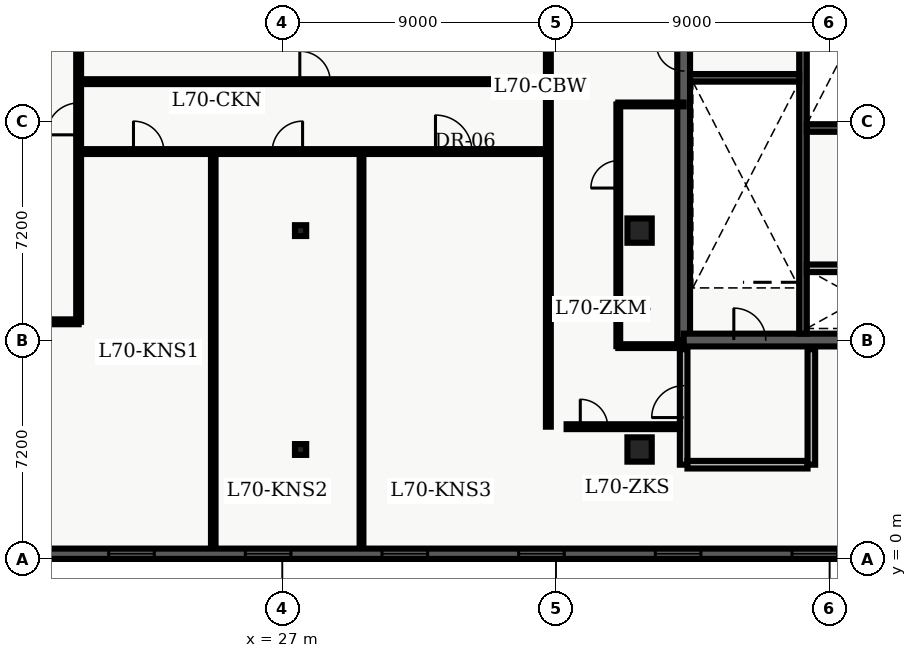
"""IFC4 building model, lengths in metres.
Left out: names, types, materials, properties, quantities, classifications, styles, units other than length and angle.
Written with IfcOpenShell. Run it as: python <this file> out.ifc"""

import sys

from ifc_helpers import new_model, entity, si_unit, converted_unit, direction, frame, origin_with_axes, origin_2d_with_axis, place, context, subcontext, project, spatial, polyline, rectangle, i_section, outline, extrude, element, fill, save


model = new_model("IFC4")
c1 = context("Model", 3, precision=1e-05, world=origin_with_axes(), true_north=direction((0.0, 1.0)))
c2 = subcontext(c1, "Body", "Model", "MODEL_VIEW")
j1 = project(units=[si_unit("LENGTHUNIT", "METRE"), converted_unit("PLANEANGLEUNIT", "DEGREE", entity("IfcPlaneAngleMeasure", 0.017), si_unit("PLANEANGLEUNIT", "RADIAN"), dimensions=[0, 0, 0, 0, 0, 0, 0])], contexts=[c1])
p1 = place(None, origin_with_axes())
s1 = spatial("IfcSite", under=j1, at=p1, CompositionType="ELEMENT")
p2 = place(p1, origin_with_axes())
s2 = spatial("IfcBuilding", under=s1, at=p2, CompositionType="ELEMENT")
p3 = place(p2, frame((0.0, 0.0, 284.1), z_axis=(0.0, 0.0, 1.0), x_axis=(1.0, 0.0, 0.0)))
s3 = spatial("IfcBuildingStorey", under=s2, at=p3, CompositionType="ELEMENT", Elevation=284.1)
p4 = place(p3, frame((40.2, 7.2, 0.0), z_axis=(0.0, 0.0, 1.0), x_axis=(0.0, 1.0, 0.0)))
e1 = element("IfcWall", 1, at=p4, inside=s3, PredefinedType="SHEAR", context=c2, shape_type="SweptSolid", body=[
    extrude(outline(polyline([(0.0, -0.21), (15.6, -0.21), (15.6, 0.21), (0.0, 0.21), (0.0, -0.21)])), origin_with_axes(), (0.0, 0.0, 1.0), 3.6),
])
p5 = place(p4, frame((12.75, 0.0, 0.0), z_axis=(0.0, 0.0, 1.0), x_axis=(1.0, 0.0, 0.0)))
e2 = element("IfcOpeningElement", 2, at=p5, cuts=e1, PredefinedType="OPENING", context=c2, shape_type="SweptSolid", body=[
    extrude(rectangle(XDim=1.2, YDim=0.44, at=origin_2d_with_axis()), origin_with_axes(), (0.0, 0.0, 1.0), 2.15),
])
p6 = place(p4, frame((9.3, 0.0, 0.0), z_axis=(0.0, 0.0, 1.0), x_axis=(1.0, 0.0, 0.0)))
e3 = element("IfcOpeningElement", 3, at=p6, cuts=e1, PredefinedType="OPENING", context=c2, shape_type="SweptSolid", body=[
    extrude(rectangle(XDim=0.9, YDim=0.44, at=origin_2d_with_axis()), origin_with_axes(), (0.0, 0.0, 1.0), 2.15),
])
p7 = place(p3, frame((40.2, 7.2, 0.0), z_axis=(0.0, 0.0, 1.0), x_axis=(1.0, 0.0, 0.0)))
e4 = element("IfcWall", 4, at=p7, inside=s3, PredefinedType="SHEAR", context=c2, shape_type="SweptSolid", body=[
    extrude(outline(polyline([(0.0, -0.21), (7.85, -0.21), (7.85, 0.21), (0.0, 0.21), (0.0, -0.21)])), origin_with_axes(), (0.0, 0.0, 1.0), 3.6),
])
p8 = place(p7, frame((2.175, 0.0, 0.0), z_axis=(0.0, 0.0, 1.0), x_axis=(1.0, 0.0, 0.0)))
e5 = element("IfcOpeningElement", 5, at=p8, cuts=e4, PredefinedType="OPENING", context=c2, shape_type="SweptSolid", body=[
    extrude(rectangle(XDim=1.05, YDim=0.44, at=origin_2d_with_axis()), origin_with_axes(), (0.0, 0.0, 1.0), 2.15),
])
p9 = place(p3, frame((44.125, 7.41, 0.0), z_axis=(0.0, 0.0, 1.0), x_axis=(0.0, 1.0, 0.0)))
e6 = element("IfcWall", 6, at=p9, inside=s3, PredefinedType="SHEAR", context=c2, shape_type="SweptSolid", body=[
    extrude(outline(polyline([(0.0, -0.125), (15.18, -0.125), (15.18, 0.125), (0.0, 0.125), (0.0, -0.125)])), origin_with_axes(), (0.0, 0.0, 1.0), 3.6),
])
for number, where, z_axis, x_axis in (
    (7, (40.41, 15.825, 0.0), (0.0, 0.0, 1.0), (1.0, 0.0, 0.0)),
    (8, (44.25, 14.175, 0.0), (0.0, 0.0, 1.0), (1.0, 0.0, 0.0)),
):
    element("IfcWall", number, at=place(p3, frame(where, z_axis=z_axis, x_axis=x_axis)), inside=s3, PredefinedType="SHEAR", context=c2, shape_type="SweptSolid", body=[
        extrude(outline(polyline([(0.0, -0.125), (3.59, -0.125), (3.59, 0.125), (0.0, 0.125), (0.0, -0.125)])), origin_with_axes(), (0.0, 0.0, 1.0), 3.6),
    ])
p10 = place(p3, frame((40.2, 3.1, 0.0), z_axis=(0.0, 0.0, 1.0), x_axis=(0.0, 1.0, 0.0)))
e9 = element("IfcWall", 9, at=p10, inside=s3, PredefinedType="SOLIDWALL", context=c2, shape_type="SweptSolid", body=[
    extrude(outline(polyline([(0.0, -0.125), (3.8, -0.125), (3.8, 0.125), (0.0, 0.125), (0.0, -0.125)])), origin_with_axes(), (0.0, 0.0, 1.0), 2.64),
])
p11 = place(p10, frame((2.075, 0.0, 0.0), z_axis=(0.0, 0.0, 1.0), x_axis=(1.0, 0.0, 0.0)))
e10 = element("IfcOpeningElement", 10, at=p11, cuts=e9, PredefinedType="OPENING", context=c2, shape_type="SweptSolid", body=[
    extrude(rectangle(XDim=1.05, YDim=0.27, at=origin_2d_with_axis()), origin_with_axes(), (0.0, 0.0, 1.0), 2.15),
])
p12 = place(p3, frame((40.325, 3.1, 0.0), z_axis=(0.0, 0.0, 1.0), x_axis=(1.0, 0.0, 0.0)))
e11 = element("IfcWall", 11, at=p12, inside=s3, PredefinedType="SOLIDWALL", context=c2, shape_type="SweptSolid", body=[
    extrude(outline(polyline([(0.0, -0.125), (3.95, -0.125), (3.95, 0.125), (0.0, 0.125), (0.0, -0.125)])), origin_with_axes(), (0.0, 0.0, 1.0), 2.64),
])
p13 = place(p3, frame((44.4, 3.1, 0.0), z_axis=(0.0, 0.0, 1.0), x_axis=(0.0, 1.0, 0.0)))
e12 = element("IfcWall", 12, at=p13, inside=s3, PredefinedType="SOLIDWALL", context=c2, shape_type="SweptSolid", body=[
    extrude(outline(polyline([(0.0, -0.125), (3.8, -0.125), (3.8, 0.125), (0.0, 0.125), (0.0, -0.125)])), origin_with_axes(), (0.0, 0.0, 1.0), 2.64),
])
for number, where, z_axis, x_axis in (
    (13, (27.6, 3.6, 0.0), (0.0, 0.0, 1.0), (1.0, 0.0, 0.0)),
    (14, (27.6, 10.8, 0.0), (0.0, 0.0, 1.0), (1.0, 0.0, 0.0)),
):
    element("IfcColumn", number, at=place(p3, frame(where, z_axis=z_axis, x_axis=x_axis)), inside=s3, PredefinedType="COLUMN", context=c2, shape_type="SweptSolid", body=[
        extrude(i_section(OverallWidth=0.369, OverallDepth=0.356, WebThickness=0.011, FlangeThickness=0.018, FilletRadius=0.018, at=origin_2d_with_axis()), origin_with_axes(), (0.0, 0.0, 1.0), 3.9),
    ])
for number, where, z_axis, x_axis in (
    (15, (38.75, 3.6, 0.0), (0.0, 0.0, 1.0), (1.0, 0.0, 0.0)),
    (16, (38.75, 10.8, 0.0), (0.0, 0.0, 1.0), (1.0, 0.0, 0.0)),
):
    element("IfcColumn", number, at=place(p3, frame(where, z_axis=z_axis, x_axis=x_axis)), inside=s3, PredefinedType="COLUMN", context=c2, shape_type="SweptSolid", body=[
        extrude(rectangle(XDim=0.8, YDim=0.8, at=origin_2d_with_axis()), origin_with_axes(), (0.0, 0.0, 1.0), 3.9),
    ])
p14 = place(p3, frame((44.25, 9.56, 0.0), z_axis=(0.0, 0.0, 1.0), x_axis=(1.0, 0.0, 0.0)))
e17 = element("IfcWall", 17, at=p14, inside=s3, PredefinedType="SOLIDWALL", context=c2, shape_type="SweptSolid", body=[
    extrude(outline(polyline([(0.0, -0.125), (3.5, -0.125), (3.5, 0.125), (0.0, 0.125), (0.0, -0.125)])), origin_with_axes(), (0.0, 0.0, 1.0), 2.64),
])
p15 = place(p3, frame((8.135, 7.8, 0.0), z_axis=(0.0, 0.0, 1.0), x_axis=(1.0, 0.0, 0.0)))
e18 = element("IfcWall", 18, at=p15, inside=s3, PredefinedType="PARTITIONING", context=c2, shape_type="SweptSolid", body=[
    extrude(outline(polyline([(0.0, -0.08), (12.165, -0.08), (12.165, 0.08), (0.0, 0.08), (0.0, -0.08)])), origin_with_axes(), (0.0, 0.0, 1.0), 2.64),
])
p16 = place(p15, frame((6.065, 0.0, 0.0), z_axis=(0.0, 0.0, 1.0), x_axis=(1.0, 0.0, 0.0)))
e19 = element("IfcOpeningElement", 19, at=p16, cuts=e18, PredefinedType="OPENING", context=c2, shape_type="SweptSolid", body=[
    extrude(rectangle(XDim=1.0, YDim=0.18, at=origin_2d_with_axis()), origin_with_axes(), (0.0, 0.0, 1.0), 2.15),
])
p17 = place(p3, frame((20.3, 7.8, 0.0), z_axis=(0.0, 0.0, 1.0), x_axis=(0.0, 1.0, 0.0)))
e20 = element("IfcWall", 20, at=p17, inside=s3, PredefinedType="PARTITIONING", context=c2, shape_type="SweptSolid", body=[
    extrude(outline(polyline([(0.0, -0.08), (32.7, -0.08), (32.7, 0.08), (0.0, 0.08), (0.0, -0.08)])), origin_with_axes(), (0.0, 0.0, 1.0), 2.64),
])
p18 = place(p17, frame((25.025, 0.0, 0.0), z_axis=(0.0, 0.0, 1.0), x_axis=(1.0, 0.0, 0.0)))
e21 = element("IfcOpeningElement", 21, at=p18, cuts=e20, PredefinedType="OPENING", context=c2, shape_type="SweptSolid", body=[
    extrude(rectangle(XDim=1.05, YDim=0.18, at=origin_2d_with_axis()), origin_with_axes(), (0.0, 0.0, 1.0), 2.15),
])
p19 = place(p17, frame((14.273, 0.0, 0.0), z_axis=(0.0, 0.0, 1.0), x_axis=(1.0, 0.0, 0.0)))
e22 = element("IfcOpeningElement", 22, at=p19, cuts=e20, PredefinedType="OPENING", context=c2, shape_type="SweptSolid", body=[
    extrude(rectangle(XDim=1.0, YDim=0.18, at=origin_2d_with_axis()), origin_with_axes(), (0.0, 0.0, 1.0), 2.15),
])
p20 = place(p17, frame((18.447, 0.0, 0.0), z_axis=(0.0, 0.0, 1.0), x_axis=(1.0, 0.0, 0.0)))
e23 = element("IfcOpeningElement", 23, at=p20, cuts=e20, PredefinedType="OPENING", context=c2, shape_type="SweptSolid", body=[
    extrude(rectangle(XDim=1.0, YDim=0.18, at=origin_2d_with_axis()), origin_with_axes(), (0.0, 0.0, 1.0), 2.15),
])
p21 = place(p17, frame((6.675, 0.0, 0.0), z_axis=(0.0, 0.0, 1.0), x_axis=(1.0, 0.0, 0.0)))
e24 = element("IfcOpeningElement", 24, at=p21, cuts=e20, PredefinedType="OPENING", context=c2, shape_type="SweptSolid", body=[
    extrude(rectangle(XDim=1.05, YDim=0.18, at=origin_2d_with_axis()), origin_with_axes(), (0.0, 0.0, 1.0), 2.15),
])
p22 = place(p3, frame((20.3, 13.4, 0.0), z_axis=(0.0, 0.0, 1.0), x_axis=(1.0, 0.0, 0.0)))
e25 = element("IfcWall", 25, at=p22, inside=s3, PredefinedType="PARTITIONING", context=c2, shape_type="SweptSolid", body=[
    extrude(outline(polyline([(0.0, -0.08), (15.45, -0.08), (15.45, 0.08), (0.0, 0.08), (0.0, -0.08)])), origin_with_axes(), (0.0, 0.0, 1.0), 2.64),
])
p23 = place(p22, frame((2.304, 0.0, 0.0), z_axis=(0.0, 0.0, 1.0), x_axis=(1.0, 0.0, 0.0)))
e26 = element("IfcOpeningElement", 26, at=p23, cuts=e25, PredefinedType="OPENING", context=c2, shape_type="SweptSolid", body=[
    extrude(rectangle(XDim=1.0, YDim=0.18, at=origin_2d_with_axis()), origin_with_axes(), (0.0, 0.0, 1.0), 2.15),
])
p24 = place(p22, frame((6.866, 0.0, 0.0), z_axis=(0.0, 0.0, 1.0), x_axis=(1.0, 0.0, 0.0)))
e27 = element("IfcOpeningElement", 27, at=p24, cuts=e25, PredefinedType="OPENING", context=c2, shape_type="SweptSolid", body=[
    extrude(rectangle(XDim=1.0, YDim=0.18, at=origin_2d_with_axis()), origin_with_axes(), (0.0, 0.0, 1.0), 2.15),
])
p25 = place(p22, frame((12.337, 0.0, 0.0), z_axis=(0.0, 0.0, 1.0), x_axis=(1.0, 0.0, 0.0)))
e28 = element("IfcOpeningElement", 28, at=p25, cuts=e25, PredefinedType="OPENING", context=c2, shape_type="SweptSolid", body=[
    extrude(rectangle(XDim=1.2, YDim=0.18, at=origin_2d_with_axis()), origin_with_axes(), (0.0, 0.0, 1.0), 2.2),
])
p26 = place(p3, frame((20.3, 15.7, 0.0), z_axis=(0.0, 0.0, 1.0), x_axis=(1.0, 0.0, 0.0)))
e29 = element("IfcWall", 29, at=p26, inside=s3, PredefinedType="PARTITIONING", context=c2, shape_type="SweptSolid", body=[
    extrude(outline(polyline([(0.0, -0.08), (15.45, -0.08), (15.45, 0.08), (0.0, 0.08), (0.0, -0.08)])), origin_with_axes(), (0.0, 0.0, 1.0), 2.64),
])
p27 = place(p26, frame((7.775, 0.0, 0.0), z_axis=(0.0, 0.0, 1.0), x_axis=(1.0, 0.0, 0.0)))
e30 = element("IfcOpeningElement", 30, at=p27, cuts=e29, PredefinedType="OPENING", context=c2, shape_type="SweptSolid", body=[
    extrude(rectangle(XDim=1.0, YDim=0.18, at=origin_2d_with_axis()), origin_with_axes(), (0.0, 0.0, 1.0), 2.15),
])
p28 = place(p3, frame((35.75, 4.35, 0.0), z_axis=(0.0, 0.0, 1.0), x_axis=(0.0, 1.0, 0.0)))
e31 = element("IfcWall", 31, at=p28, inside=s3, PredefinedType="PARTITIONING", context=c2, shape_type="SweptSolid", body=[
    extrude(outline(polyline([(0.0, -0.08), (16.95, -0.08), (16.95, 0.08), (0.0, 0.08), (0.0, -0.08)])), origin_with_axes(), (0.0, 0.0, 1.0), 2.64),
])
p29 = place(p3, frame((24.728, 0.335, 0.0), z_axis=(0.0, 0.0, 1.0), x_axis=(0.0, 1.0, 0.0)))
e32 = element("IfcWall", 32, at=p29, inside=s3, PredefinedType="PARTITIONING", context=c2, shape_type="SweptSolid", body=[
    extrude(outline(polyline([(0.0, -0.075), (12.945, -0.075), (12.945, 0.075), (0.0, 0.075), (0.0, -0.075)])), origin_with_axes(), (0.0, 0.0, 1.0), 2.64),
])
p30 = place(p3, frame((29.604, 0.335, 0.0), z_axis=(0.0, 0.0, 1.0), x_axis=(0.0, 1.0, 0.0)))
e33 = element("IfcWall", 33, at=p30, inside=s3, PredefinedType="PARTITIONING", context=c2, shape_type="SweptSolid", body=[
    extrude(outline(polyline([(0.0, -0.062), (12.945, -0.062), (12.945, 0.062), (0.0, 0.062), (0.0, -0.062)])), origin_with_axes(), (0.0, 0.0, 1.0), 2.64),
])
p31 = place(p3, frame((36.35, 4.35, 0.0), z_axis=(0.0, 0.0, 1.0), x_axis=(1.0, 0.0, 0.0)))
e34 = element("IfcWall", 34, at=p31, inside=s3, PredefinedType="PARTITIONING", context=c2, shape_type="SweptSolid", body=[
    extrude(outline(polyline([(0.0, -0.08), (3.725, -0.08), (3.725, 0.08), (0.0, 0.08), (0.0, -0.08)])), origin_with_axes(), (0.0, 0.0, 1.0), 2.64),
])
p32 = place(p31, frame((0.9, 0.0, 0.0), z_axis=(0.0, 0.0, 1.0), x_axis=(1.0, 0.0, 0.0)))
e35 = element("IfcOpeningElement", 35, at=p32, cuts=e34, PredefinedType="OPENING", context=c2, shape_type="SweptSolid", body=[
    extrude(rectangle(XDim=0.9, YDim=0.18, at=origin_2d_with_axis()), origin_with_axes(), (0.0, 0.0, 1.0), 2.15),
])
for number, where, z_axis, x_axis in (
    (36, (38.05, 7.0, 0.0), (0.0, 0.0, 1.0), (1.0, 0.0, 0.0)),
    (37, (38.05, 14.95, 0.0), (0.0, 0.0, 1.0), (1.0, 0.0, 0.0)),
):
    element("IfcWall", number, at=place(p3, frame(where, z_axis=z_axis, x_axis=x_axis)), inside=s3, PredefinedType="PARTITIONING", context=c2, shape_type="SweptSolid", body=[
        extrude(outline(polyline([(0.0, -0.062), (2.15, -0.062), (2.15, 0.062), (0.0, 0.062), (0.0, -0.062)])), origin_with_axes(), (0.0, 0.0, 1.0), 2.64),
    ])
p33 = place(p3, frame((38.05, 7.0, 0.0), z_axis=(0.0, 0.0, 1.0), x_axis=(0.0, 1.0, 0.0)))
e38 = element("IfcWall", 38, at=p33, inside=s3, PredefinedType="PARTITIONING", context=c2, shape_type="SweptSolid", body=[
    extrude(outline(polyline([(0.0, -0.062), (7.95, -0.062), (7.95, 0.062), (0.0, 0.062), (0.0, -0.062)])), origin_with_axes(), (0.0, 0.0, 1.0), 2.64),
])
p34 = place(p33, frame((5.65, 0.0, 0.0), z_axis=(0.0, 0.0, 1.0), x_axis=(1.0, 0.0, 0.0)))
e39 = element("IfcOpeningElement", 39, at=p34, cuts=e38, PredefinedType="OPENING", context=c2, shape_type="SweptSolid", body=[
    extrude(rectangle(XDim=0.9, YDim=0.145, at=origin_2d_with_axis()), origin_with_axes(), (0.0, 0.0, 1.0), 2.15),
])
p35 = place(p3, frame((47.36, 0.17, 0.0), z_axis=(0.0, 0.0, 1.0), x_axis=(-1.0, 0.0, 0.0)))
e40 = element("IfcWall", 40, at=p35, inside=s3, PredefinedType="SOLIDWALL", context=c2, shape_type="SweptSolid", body=[
    extrude(outline(polyline([(0.0, -0.17), (37.16, -0.17), (37.16, 0.17), (0.0, 0.17), (0.0, -0.17)])), origin_with_axes(), (0.0, 0.0, 1.0), 3.6),
])
p36 = place(p35, frame((2.847, 0.0, 0.45), z_axis=(0.0, 0.0, 1.0), x_axis=(1.0, 0.0, 0.0)))
e41 = element("IfcOpeningElement", 41, at=p36, cuts=e40, PredefinedType="OPENING", context=c2, shape_type="SweptSolid", body=[
    extrude(rectangle(XDim=1.5, YDim=0.36, at=origin_2d_with_axis()), origin_with_axes(), (0.0, 0.0, 1.0), 2.1),
])
p37 = place(p35, frame((7.342, 0.0, 0.45), z_axis=(0.0, 0.0, 1.0), x_axis=(1.0, 0.0, 0.0)))
e42 = element("IfcOpeningElement", 42, at=p37, cuts=e40, PredefinedType="OPENING", context=c2, shape_type="SweptSolid", body=[
    extrude(rectangle(XDim=1.5, YDim=0.36, at=origin_2d_with_axis()), origin_with_axes(), (0.0, 0.0, 1.0), 2.1),
])
p38 = place(p35, frame((11.837, 0.0, 0.45), z_axis=(0.0, 0.0, 1.0), x_axis=(1.0, 0.0, 0.0)))
e43 = element("IfcOpeningElement", 43, at=p38, cuts=e40, PredefinedType="OPENING", context=c2, shape_type="SweptSolid", body=[
    extrude(rectangle(XDim=1.5, YDim=0.36, at=origin_2d_with_axis()), origin_with_axes(), (0.0, 0.0, 1.0), 2.1),
])
p39 = place(p35, frame((16.332, 0.0, 0.45), z_axis=(0.0, 0.0, 1.0), x_axis=(1.0, 0.0, 0.0)))
e44 = element("IfcOpeningElement", 44, at=p39, cuts=e40, PredefinedType="OPENING", context=c2, shape_type="SweptSolid", body=[
    extrude(rectangle(XDim=1.5, YDim=0.36, at=origin_2d_with_axis()), origin_with_axes(), (0.0, 0.0, 1.0), 2.1),
])
p40 = place(p35, frame((20.827, 0.0, 0.45), z_axis=(0.0, 0.0, 1.0), x_axis=(1.0, 0.0, 0.0)))
e45 = element("IfcOpeningElement", 45, at=p40, cuts=e40, PredefinedType="OPENING", context=c2, shape_type="SweptSolid", body=[
    extrude(rectangle(XDim=1.5, YDim=0.36, at=origin_2d_with_axis()), origin_with_axes(), (0.0, 0.0, 1.0), 2.1),
])
p41 = place(p35, frame((25.322, 0.0, 0.45), z_axis=(0.0, 0.0, 1.0), x_axis=(1.0, 0.0, 0.0)))
e46 = element("IfcOpeningElement", 46, at=p41, cuts=e40, PredefinedType="OPENING", context=c2, shape_type="SweptSolid", body=[
    extrude(rectangle(XDim=1.5, YDim=0.36, at=origin_2d_with_axis()), origin_with_axes(), (0.0, 0.0, 1.0), 2.1),
])
p42 = place(p35, frame((29.817, 0.0, 0.45), z_axis=(0.0, 0.0, 1.0), x_axis=(1.0, 0.0, 0.0)))
e47 = element("IfcOpeningElement", 47, at=p42, cuts=e40, PredefinedType="OPENING", context=c2, shape_type="SweptSolid", body=[
    extrude(rectangle(XDim=1.5, YDim=0.36, at=origin_2d_with_axis()), origin_with_axes(), (0.0, 0.0, 1.0), 2.1),
])
p43 = place(p35, frame((34.312, 0.0, 0.45), z_axis=(0.0, 0.0, 1.0), x_axis=(1.0, 0.0, 0.0)))
e48 = element("IfcOpeningElement", 48, at=p43, cuts=e40, PredefinedType="OPENING", context=c2, shape_type="SweptSolid", body=[
    extrude(rectangle(XDim=1.5, YDim=0.36, at=origin_2d_with_axis()), origin_with_axes(), (0.0, 0.0, 1.0), 2.1),
])
p44 = place(p4, frame((9.3, 0.0, 0.0), z_axis=(0.0, 0.0, 1.0), x_axis=(1.0, 0.0, 0.0)))
e49 = element("IfcDoor", 49, at=p44, inside=s3, OperationType="SINGLE_SWING_RIGHT", PredefinedType="DOOR", context=c2, shape_type="SweptSolid", body=[
    extrude(rectangle(XDim=0.9, YDim=0.09, at=origin_2d_with_axis()), origin_with_axes(), (0.0, 0.0, 1.0), 2.15),
])
fill(e3, e49)
p45 = place(p7, frame((2.175, 0.0, 0.0), z_axis=(0.0, 0.0, 1.0), x_axis=(1.0, 0.0, 0.0)))
e50 = element("IfcDoor", 50, at=p45, inside=s3, OperationType="SINGLE_SWING_LEFT", PredefinedType="DOOR", context=c2, shape_type="SweptSolid", body=[
    extrude(rectangle(XDim=1.05, YDim=0.09, at=origin_2d_with_axis()), origin_with_axes(), (0.0, 0.0, 1.0), 2.15),
])
fill(e5, e50)
p46 = place(p10, frame((2.075, 0.0, 0.0), z_axis=(0.0, 0.0, 1.0), x_axis=(1.0, 0.0, 0.0)))
e51 = element("IfcDoor", 51, at=p46, inside=s3, OperationType="SINGLE_SWING_LEFT", PredefinedType="DOOR", context=c2, shape_type="SweptSolid", body=[
    extrude(rectangle(XDim=1.05, YDim=0.09, at=origin_2d_with_axis()), origin_with_axes(), (0.0, 0.0, 1.0), 2.15),
])
fill(e10, e51)
p47 = place(p17, frame((6.675, 0.0, 0.0), z_axis=(0.0, 0.0, 1.0), x_axis=(1.0, 0.0, 0.0)))
e52 = element("IfcDoor", 52, at=p47, inside=s3, OperationType="SINGLE_SWING_LEFT", PredefinedType="DOOR", context=c2, shape_type="SweptSolid", body=[
    extrude(rectangle(XDim=1.05, YDim=0.09, at=origin_2d_with_axis()), origin_with_axes(), (0.0, 0.0, 1.0), 2.15),
])
fill(e24, e52)
p48 = place(p22, frame((2.304, 0.0, 0.0), z_axis=(0.0, 0.0, 1.0), x_axis=(1.0, 0.0, 0.0)))
e53 = element("IfcDoor", 53, at=p48, inside=s3, OperationType="SINGLE_SWING_LEFT", PredefinedType="DOOR", context=c2, shape_type="SweptSolid", body=[
    extrude(rectangle(XDim=1.0, YDim=0.09, at=origin_2d_with_axis()), origin_with_axes(), (0.0, 0.0, 1.0), 2.15),
])
fill(e26, e53)
p49 = place(p22, frame((6.866, 0.0, 0.0), z_axis=(0.0, 0.0, 1.0), x_axis=(1.0, 0.0, 0.0)))
e54 = element("IfcDoor", 54, at=p49, inside=s3, OperationType="SINGLE_SWING_RIGHT", PredefinedType="DOOR", context=c2, shape_type="SweptSolid", body=[
    extrude(rectangle(XDim=1.0, YDim=0.09, at=origin_2d_with_axis()), origin_with_axes(), (0.0, 0.0, 1.0), 2.15),
])
fill(e27, e54)
p50 = place(p22, frame((12.337, 0.0, 0.0), z_axis=(0.0, 0.0, 1.0), x_axis=(1.0, 0.0, 0.0)))
e55 = element("IfcDoor", 55, at=p50, inside=s3, OperationType="SINGLE_SWING_LEFT", PredefinedType="DOOR", context=c2, shape_type="SweptSolid", body=[
    extrude(rectangle(XDim=1.2, YDim=0.09, at=origin_2d_with_axis()), origin_with_axes(), (0.0, 0.0, 1.0), 2.2),
])
fill(e28, e55)
p51 = place(p26, frame((7.775, 0.0, 0.0), z_axis=(0.0, 0.0, 1.0), x_axis=(1.0, 0.0, 0.0)))
e56 = element("IfcDoor", 56, at=p51, inside=s3, OperationType="SINGLE_SWING_LEFT", PredefinedType="DOOR", context=c2, shape_type="SweptSolid", body=[
    extrude(rectangle(XDim=1.0, YDim=0.09, at=origin_2d_with_axis()), origin_with_axes(), (0.0, 0.0, 1.0), 2.15),
])
fill(e30, e56)
p52 = place(p31, frame((0.9, 0.0, 0.0), z_axis=(0.0, 0.0, 1.0), x_axis=(1.0, 0.0, 0.0)))
e57 = element("IfcDoor", 57, at=p52, inside=s3, OperationType="SINGLE_SWING_LEFT", PredefinedType="DOOR", context=c2, shape_type="SweptSolid", body=[
    extrude(rectangle(XDim=0.9, YDim=0.09, at=origin_2d_with_axis()), origin_with_axes(), (0.0, 0.0, 1.0), 2.15),
])
fill(e35, e57)
p53 = place(p33, frame((5.65, 0.0, 0.0), z_axis=(0.0, 0.0, 1.0), x_axis=(1.0, 0.0, 0.0)))
e58 = element("IfcDoor", 58, at=p53, inside=s3, OperationType="SINGLE_SWING_LEFT", PredefinedType="DOOR", context=c2, shape_type="SweptSolid", body=[
    extrude(rectangle(XDim=0.9, YDim=0.075, at=origin_2d_with_axis()), origin_with_axes(), (0.0, 0.0, 1.0), 2.15),
])
fill(e39, e58)
p54 = place(p35, frame((2.847, 0.0, 0.45), z_axis=(0.0, 0.0, 1.0), x_axis=(1.0, 0.0, 0.0)))
e59 = element("IfcWindow", 59, at=p54, inside=s3, PredefinedType="WINDOW", context=c2, shape_type="SweptSolid", body=[
    extrude(rectangle(XDim=1.5, YDim=0.09, at=origin_2d_with_axis()), origin_with_axes(), (0.0, 0.0, 1.0), 2.1),
])
fill(e41, e59)
p55 = place(p35, frame((7.342, 0.0, 0.45), z_axis=(0.0, 0.0, 1.0), x_axis=(1.0, 0.0, 0.0)))
e60 = element("IfcWindow", 60, at=p55, inside=s3, PredefinedType="WINDOW", context=c2, shape_type="SweptSolid", body=[
    extrude(rectangle(XDim=1.5, YDim=0.09, at=origin_2d_with_axis()), origin_with_axes(), (0.0, 0.0, 1.0), 2.1),
])
fill(e42, e60)
p56 = place(p35, frame((11.837, 0.0, 0.45), z_axis=(0.0, 0.0, 1.0), x_axis=(1.0, 0.0, 0.0)))
e61 = element("IfcWindow", 61, at=p56, inside=s3, PredefinedType="WINDOW", context=c2, shape_type="SweptSolid", body=[
    extrude(rectangle(XDim=1.5, YDim=0.09, at=origin_2d_with_axis()), origin_with_axes(), (0.0, 0.0, 1.0), 2.1),
])
fill(e43, e61)
p57 = place(p35, frame((16.332, 0.0, 0.45), z_axis=(0.0, 0.0, 1.0), x_axis=(1.0, 0.0, 0.0)))
e62 = element("IfcWindow", 62, at=p57, inside=s3, PredefinedType="WINDOW", context=c2, shape_type="SweptSolid", body=[
    extrude(rectangle(XDim=1.5, YDim=0.09, at=origin_2d_with_axis()), origin_with_axes(), (0.0, 0.0, 1.0), 2.1),
])
fill(e44, e62)
p58 = place(p35, frame((20.827, 0.0, 0.45), z_axis=(0.0, 0.0, 1.0), x_axis=(1.0, 0.0, 0.0)))
e63 = element("IfcWindow", 63, at=p58, inside=s3, PredefinedType="WINDOW", context=c2, shape_type="SweptSolid", body=[
    extrude(rectangle(XDim=1.5, YDim=0.09, at=origin_2d_with_axis()), origin_with_axes(), (0.0, 0.0, 1.0), 2.1),
])
fill(e45, e63)
p59 = place(p35, frame((25.322, 0.0, 0.45), z_axis=(0.0, 0.0, 1.0), x_axis=(1.0, 0.0, 0.0)))
e64 = element("IfcWindow", 64, at=p59, inside=s3, PredefinedType="WINDOW", context=c2, shape_type="SweptSolid", body=[
    extrude(rectangle(XDim=1.5, YDim=0.09, at=origin_2d_with_axis()), origin_with_axes(), (0.0, 0.0, 1.0), 2.1),
])
fill(e46, e64)
save(model, sys.argv[1])
